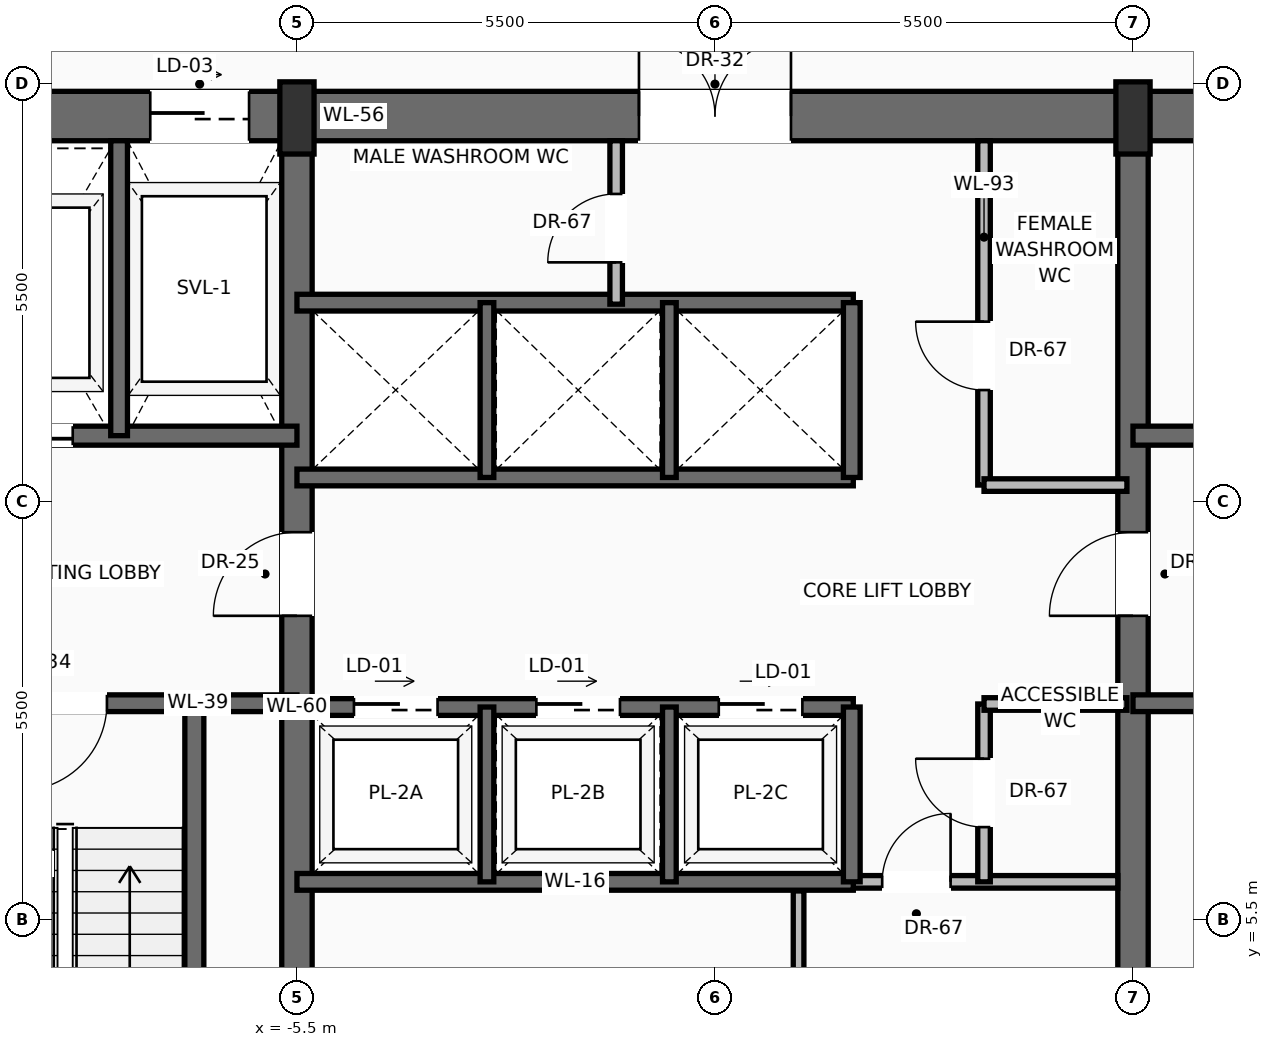
"""IFC4 building model, lengths in metres.
Left out: names, types, materials, properties, quantities, classifications, styles, units other than length and angle.
Written with IfcOpenShell. Run it as: python <this file> out.ifc"""

import sys

from ifc_helpers import new_model, si_unit, direction, frame, frame_2d, origin, origin_2d, place, context, subcontext, project, spatial, rectangle, extrude, source, transform, mapped, element, fill, save


model = new_model("IFC4")
c1 = context("Model", 3, precision=1e-05, world=origin(), true_north=direction((0.0, 1.0)))
c2 = subcontext(c1, "Body", "Model", "MODEL_VIEW")
j1 = project(units=[si_unit("LENGTHUNIT", "METRE"), si_unit("PLANEANGLEUNIT", "RADIAN")], contexts=[c1])
p1 = place(None, origin())
s1 = spatial("IfcSite", under=j1, at=p1, CompositionType="ELEMENT")
p2 = place(p1, origin())
s2 = spatial("IfcBuilding", under=s1, at=p2, CompositionType="ELEMENT")
p3 = place(p2, frame((0.0, 0.0, 208.0)))
s3 = spatial("IfcBuildingStorey", under=s2, at=p3, CompositionType="ELEMENT", Elevation=208.0)
p4 = place(p3, frame((-10.8, 16.075, 0.0), z_axis=(0.0, 0.0, 1.0), x_axis=(1.0, 0.0, 0.0)))
e1 = element("IfcWall", 1, at=p4, inside=s3, PredefinedType="SHEAR", context=c2, shape_type="SweptSolid", body=[
    extrude(rectangle(XDim=21.6, YDim=0.65, at=frame_2d((10.8, 0.0))), origin(), (0.0, 0.0, 1.0), 3.47),
])
p5 = place(p4, frame((3.37, 0.0, 0.0)))
e2 = element("IfcOpeningElement", 2, at=p5, cuts=e1, PredefinedType="OPENING", context=c2, shape_type="SweptSolid", body=[
    extrude(rectangle(XDim=1.3, YDim=2.3, at=frame_2d((0.65, 1.15))), frame((0.0, 0.335, 0.0), z_axis=(0.0, -1.0, 0.0), x_axis=(1.0, 0.0, 0.0)), (0.0, 0.0, 1.0), 0.67),
])
p6 = place(p4, frame((9.8, 0.0, 0.0)))
e3 = element("IfcOpeningElement", 3, at=p6, cuts=e1, PredefinedType="OPENING", context=c2, shape_type="SweptSolid", body=[
    extrude(rectangle(XDim=2.0, YDim=2.4, at=frame_2d((1.0, 1.2))), frame((0.0, 0.335, 0.0), z_axis=(0.0, -1.0, 0.0), x_axis=(1.0, 0.0, 0.0)), (0.0, 0.0, 1.0), 0.67),
])
p7 = place(p3, frame((-5.5, 0.525, 0.0), z_axis=(0.0, 0.0, 1.0), x_axis=(0.0, 1.0, 0.0)))
e4 = element("IfcWall", 4, at=p7, inside=s3, PredefinedType="SHEAR", context=c2, shape_type="SweptSolid", body=[
    extrude(rectangle(XDim=15.55, YDim=0.4, at=frame_2d((7.775, 0.0))), origin(), (0.0, 0.0, 1.0), 3.47),
])
p8 = place(p7, frame((8.975, 0.0, 0.0)))
e5 = element("IfcOpeningElement", 5, at=p8, cuts=e4, PredefinedType="OPENING", context=c2, shape_type="SweptSolid", body=[
    extrude(rectangle(XDim=1.1, YDim=2.2, at=frame_2d((0.55, 1.1))), frame((0.0, 0.21, 0.0), z_axis=(0.0, -1.0, 0.0), x_axis=(1.0, 0.0, 0.0)), (0.0, 0.0, 1.0), 0.42),
])
p9 = place(p3, frame((5.5, 0.525, 0.0), z_axis=(0.0, 0.0, 1.0), x_axis=(0.0, 1.0, 0.0)))
e6 = element("IfcWall", 6, at=p9, inside=s3, PredefinedType="SHEAR", context=c2, shape_type="SweptSolid", body=[
    extrude(rectangle(XDim=15.55, YDim=0.4, at=frame_2d((7.775, 0.0))), origin(), (0.0, 0.0, 1.0), 3.47),
])
p10 = place(p9, frame((8.975, 0.0, 0.0)))
e7 = element("IfcOpeningElement", 7, at=p10, cuts=e6, PredefinedType="OPENING", context=c2, shape_type="SweptSolid", body=[
    extrude(rectangle(XDim=1.1, YDim=2.2, at=frame_2d((0.55, 1.1))), frame((0.0, 0.21, 0.0), z_axis=(0.0, -1.0, 0.0), x_axis=(1.0, 0.0, 0.0)), (0.0, 0.0, 1.0), 0.42),
])
m1 = source(origin(), c2, "Body", "SweptSolid", [
    extrude(rectangle(XDim=0.45, YDim=0.95, at=origin_2d()), origin(), (0.0, 0.0, 1.0), 3.7),
])
for number, where, z_axis, x_axis in (
    (8, (-5.5, 16.05, 0.0), (0.0, 0.0, 1.0), (1.0, 0.0, 0.0)),
    (9, (5.5, 16.05, 0.0), (0.0, 0.0, 1.0), (1.0, 0.0, 0.0)),
):
    element("IfcColumn", number, at=place(p3, frame(where, z_axis=z_axis, x_axis=x_axis)), inside=s3, PredefinedType="PILASTER", context=c2, shape_type="MappedRepresentation", body=[
        mapped(m1, transform((0.0, 0.0, 0.0), scale=1.0)),
    ])
p11 = place(p3, frame((-6.85, 0.85, 0.0), z_axis=(0.0, 0.0, 1.0), x_axis=(0.0, 1.0, 0.0)))
e10 = element("IfcWall", 10, at=p11, inside=s3, PredefinedType="SOLIDWALL", context=c2, shape_type="SweptSolid", body=[
    extrude(rectangle(XDim=7.5, YDim=0.25, at=frame_2d((3.75, 0.0))), origin(), (0.0, 0.0, 1.0), 3.47),
])
p12 = place(p3, frame((-5.5, 8.35, 0.0), z_axis=(0.0, 0.0, 1.0), x_axis=(-1.0, 0.0, 0.0)))
e11 = element("IfcWall", 11, at=p12, inside=s3, PredefinedType="SOLIDWALL", context=c2, shape_type="SweptSolid", body=[
    extrude(rectangle(XDim=4.65, YDim=0.22, at=frame_2d((2.325, 0.0))), origin(), (0.0, 0.0, 1.0), 3.47),
])
p13 = place(p12, frame((2.5, 0.0, 0.0)))
e12 = element("IfcOpeningElement", 12, at=p13, cuts=e11, PredefinedType="OPENING", context=c2, shape_type="SweptSolid", body=[
    extrude(rectangle(XDim=1.15, YDim=2.2, at=frame_2d((0.575, 1.1))), frame((0.0, 0.12, 0.0), z_axis=(0.0, -1.0, 0.0), x_axis=(1.0, 0.0, 0.0)), (0.0, 0.0, 1.0), 0.24),
])
p14 = place(p3, frame((-5.5, 11.87, 0.0), z_axis=(0.0, 0.0, 1.0), x_axis=(-1.0, 0.0, 0.0)))
e13 = element("IfcWall", 13, at=p14, inside=s3, PredefinedType="SOLIDWALL", context=c2, shape_type="SweptSolid", body=[
    extrude(rectangle(XDim=4.65, YDim=0.25, at=frame_2d((2.325, 0.0))), origin(), (0.0, 0.0, 1.0), 3.47),
])
p15 = place(p14, frame((2.95, 0.0, 0.0)))
e14 = element("IfcOpeningElement", 14, at=p15, cuts=e13, PredefinedType="OPENING", context=c2, shape_type="SweptSolid", body=[
    extrude(rectangle(XDim=1.2, YDim=2.25, at=frame_2d((0.6, 1.125))), frame((0.0, 0.135, 0.0), z_axis=(0.0, -1.0, 0.0), x_axis=(1.0, 0.0, 0.0)), (0.0, 0.0, 1.0), 0.27),
])
p16 = place(p3, frame((-7.84, 11.87, 0.0), z_axis=(0.0, 0.0, 1.0), x_axis=(0.0, 1.0, 0.0)))
e15 = element("IfcWall", 15, at=p16, inside=s3, PredefinedType="SOLIDWALL", context=c2, shape_type="SweptSolid", body=[
    extrude(rectangle(XDim=3.88, YDim=0.22, at=frame_2d((1.94, 0.0))), origin(), (0.0, 0.0, 1.0), 3.47),
])
p17 = place(p3, frame((10.15, 8.35, 0.0), z_axis=(0.0, 0.0, 1.0), x_axis=(-1.0, 0.0, 0.0)))
e16 = element("IfcWall", 16, at=p17, inside=s3, PredefinedType="SOLIDWALL", context=c2, shape_type="SweptSolid", body=[
    extrude(rectangle(XDim=4.65, YDim=0.22, at=frame_2d((2.325, 0.0))), origin(), (0.0, 0.0, 1.0), 3.47),
])
p18 = place(p17, frame((1.0, 0.0, 0.0)))
e17 = element("IfcOpeningElement", 17, at=p18, cuts=e16, PredefinedType="OPENING", context=c2, shape_type="SweptSolid", body=[
    extrude(rectangle(XDim=1.15, YDim=2.2, at=frame_2d((0.575, 1.1))), frame((0.0, 0.12, 0.0), z_axis=(0.0, -1.0, 0.0), x_axis=(1.0, 0.0, 0.0)), (0.0, 0.0, 1.0), 0.24),
])
p19 = place(p3, frame((10.15, 11.87, 0.0), z_axis=(0.0, 0.0, 1.0), x_axis=(-1.0, 0.0, 0.0)))
e18 = element("IfcWall", 18, at=p19, inside=s3, PredefinedType="SOLIDWALL", context=c2, shape_type="SweptSolid", body=[
    extrude(rectangle(XDim=4.65, YDim=0.25, at=frame_2d((2.325, 0.0))), origin(), (0.0, 0.0, 1.0), 3.47),
])
p20 = place(p19, frame((0.5, 0.0, 0.0)))
e19 = element("IfcOpeningElement", 19, at=p20, cuts=e18, PredefinedType="OPENING", context=c2, shape_type="SweptSolid", body=[
    extrude(rectangle(XDim=1.2, YDim=2.25, at=frame_2d((0.6, 1.125))), frame((0.0, 0.135, 0.0), z_axis=(0.0, -1.0, 0.0), x_axis=(1.0, 0.0, 0.0)), (0.0, 0.0, 1.0), 0.27),
])
p21 = place(p3, frame((1.82, 6.0, 0.0), z_axis=(0.0, 0.0, 1.0), x_axis=(1.0, 0.0, 0.0)))
e20 = element("IfcWall", 20, at=p21, inside=s3, PredefinedType="PARTITIONING", context=c2, shape_type="SweptSolid", body=[
    extrude(rectangle(XDim=3.48, YDim=0.165, at=frame_2d((1.74, 0.0))), origin(), (0.0, 0.0, 1.0), 3.462),
])
p22 = place(p21, frame((0.38, 0.0, 0.0)))
e21 = element("IfcOpeningElement", 21, at=p22, cuts=e20, PredefinedType="OPENING", context=c2, shape_type="SweptSolid", body=[
    extrude(rectangle(XDim=0.9, YDim=2.1, at=frame_2d((0.45, 1.05))), frame((0.0, 0.093, 0.0), z_axis=(0.0, -1.0, 0.0), x_axis=(1.0, 0.0, 0.0)), (0.0, 0.0, 1.0), 0.185),
])
p23 = place(p3, frame((1.1, 0.85, 0.0), z_axis=(0.0, 0.0, 1.0), x_axis=(0.0, 1.0, 0.0)))
e22 = element("IfcWall", 22, at=p23, inside=s3, PredefinedType="PARTITIONING", context=c2, shape_type="SweptSolid", body=[
    extrude(rectangle(XDim=5.03, YDim=0.14, at=frame_2d((2.515, 0.0))), origin(), (0.0, 0.0, 1.0), 3.462),
])
p24 = place(p23, frame((2.1, 0.0, 0.0)))
e23 = element("IfcOpeningElement", 23, at=p24, cuts=e22, PredefinedType="OPENING", context=c2, shape_type="SweptSolid", body=[
    extrude(rectangle(XDim=0.9, YDim=2.1, at=frame_2d((0.45, 1.05))), frame((0.0, 0.08, 0.0), z_axis=(0.0, -1.0, 0.0), x_axis=(1.0, 0.0, 0.0)), (0.0, 0.0, 1.0), 0.16),
])
p25 = place(p3, frame((3.54, 6.0, 0.0), z_axis=(0.0, 0.0, 1.0), x_axis=(0.0, 1.0, 0.0)))
e24 = element("IfcWall", 24, at=p25, inside=s3, PredefinedType="PARTITIONING", context=c2, shape_type="SweptSolid", body=[
    extrude(rectangle(XDim=2.34, YDim=0.165, at=frame_2d((1.17, 0.0))), origin(), (0.0, 0.0, 1.0), 3.462),
])
p26 = place(p25, frame((0.72, 0.0, 0.0)))
e25 = element("IfcOpeningElement", 25, at=p26, cuts=e24, PredefinedType="OPENING", context=c2, shape_type="SweptSolid", body=[
    extrude(rectangle(XDim=0.9, YDim=2.1, at=frame_2d((0.45, 1.05))), frame((0.0, 0.093, 0.0), z_axis=(0.0, -1.0, 0.0), x_axis=(1.0, 0.0, 0.0)), (0.0, 0.0, 1.0), 0.185),
])
p27 = place(p3, frame((3.54, 8.34, 0.0), z_axis=(0.0, 0.0, 1.0), x_axis=(1.0, 0.0, 0.0)))
e26 = element("IfcWall", 26, at=p27, inside=s3, PredefinedType="PARTITIONING", context=c2, shape_type="SweptSolid", body=[
    extrude(rectangle(XDim=1.88, YDim=0.165, at=frame_2d((0.94, 0.0))), origin(), (0.0, 0.0, 1.0), 3.462),
])
p28 = place(p3, frame((-5.5, 6.0, 0.0), z_axis=(0.0, 0.0, 1.0), x_axis=(1.0, 0.0, 0.0)))
e27 = element("IfcWall", 27, at=p28, inside=s3, PredefinedType="SOLIDWALL", context=c2, shape_type="SweptSolid", body=[
    extrude(rectangle(XDim=7.32, YDim=0.22, at=frame_2d((3.66, 0.0))), origin(), (0.0, 0.0, 1.0), 3.47),
])
p29 = place(p3, frame((-5.5, 8.3, 0.0), z_axis=(0.0, 0.0, 1.0), x_axis=(1.0, 0.0, 0.0)))
e28 = element("IfcWall", 28, at=p29, inside=s3, PredefinedType="SOLIDWALL", context=c2, shape_type="SweptSolid", body=[
    extrude(rectangle(XDim=7.32, YDim=0.22, at=frame_2d((3.66, 0.0))), origin(), (0.0, 0.0, 1.0), 3.47),
])
p30 = place(p29, frame((0.75, 0.0, 0.0)))
e29 = element("IfcOpeningElement", 29, at=p30, cuts=e28, PredefinedType="OPENING", context=c2, shape_type="SweptSolid", body=[
    extrude(rectangle(XDim=1.1, YDim=2.2, at=frame_2d((0.55, 1.1))), frame((0.0, 0.12, 0.0), z_axis=(0.0, -1.0, 0.0), x_axis=(1.0, 0.0, 0.0)), (0.0, 0.0, 1.0), 0.24),
])
p31 = place(p29, frame((3.15, 0.0, 0.0)))
e30 = element("IfcOpeningElement", 30, at=p31, cuts=e28, PredefinedType="OPENING", context=c2, shape_type="SweptSolid", body=[
    extrude(rectangle(XDim=1.1, YDim=2.2, at=frame_2d((0.55, 1.1))), frame((0.0, 0.12, 0.0), z_axis=(0.0, -1.0, 0.0), x_axis=(1.0, 0.0, 0.0)), (0.0, 0.0, 1.0), 0.24),
])
p32 = place(p29, frame((5.55, 0.0, 0.0)))
e31 = element("IfcOpeningElement", 31, at=p32, cuts=e28, PredefinedType="OPENING", context=c2, shape_type="SweptSolid", body=[
    extrude(rectangle(XDim=1.1, YDim=2.2, at=frame_2d((0.55, 1.1))), frame((0.0, 0.12, 0.0), z_axis=(0.0, -1.0, 0.0), x_axis=(1.0, 0.0, 0.0)), (0.0, 0.0, 1.0), 0.24),
])
p33 = place(p3, frame((1.8, 6.0, 0.0), z_axis=(0.0, 0.0, 1.0), x_axis=(0.0, 1.0, 0.0)))
e32 = element("IfcWall", 32, at=p33, inside=s3, PredefinedType="SOLIDWALL", context=c2, shape_type="SweptSolid", body=[
    extrude(rectangle(XDim=2.3, YDim=0.22, at=frame_2d((1.15, 0.0))), origin(), (0.0, 0.0, 1.0), 3.47),
])
for number, where, z_axis, x_axis in (
    (33, (-3.0, 6.0, 0.0), (0.0, 0.0, 1.0), (0.0, 1.0, 0.0)),
    (34, (-0.6, 6.0, 0.0), (0.0, 0.0, 1.0), (0.0, 1.0, 0.0)),
):
    element("IfcWall", number, at=place(p3, frame(where, z_axis=z_axis, x_axis=x_axis)), inside=s3, PredefinedType="SOLIDWALL", context=c2, shape_type="SweptSolid", body=[
        extrude(rectangle(XDim=2.3, YDim=0.18, at=frame_2d((1.15, 0.0))), origin(), (0.0, 0.0, 1.0), 3.47),
    ])
for number, where, z_axis, x_axis in (
    (35, (-5.5, 11.32, 0.0), (0.0, 0.0, 1.0), (1.0, 0.0, 0.0)),
    (36, (-5.5, 13.62, 0.0), (0.0, 0.0, 1.0), (1.0, 0.0, 0.0)),
):
    element("IfcWall", number, at=place(p3, frame(where, z_axis=z_axis, x_axis=x_axis)), inside=s3, PredefinedType="SOLIDWALL", context=c2, shape_type="SweptSolid", body=[
        extrude(rectangle(XDim=7.32, YDim=0.22, at=frame_2d((3.66, 0.0))), origin(), (0.0, 0.0, 1.0), 3.47),
    ])
p34 = place(p3, frame((1.8, 11.32, 0.0), z_axis=(0.0, 0.0, 1.0), x_axis=(0.0, 1.0, 0.0)))
e37 = element("IfcWall", 37, at=p34, inside=s3, PredefinedType="SOLIDWALL", context=c2, shape_type="SweptSolid", body=[
    extrude(rectangle(XDim=2.3, YDim=0.22, at=frame_2d((1.15, 0.0))), origin(), (0.0, 0.0, 1.0), 3.47),
])
for number, where, z_axis, x_axis in (
    (38, (-3.0, 11.32, 0.0), (0.0, 0.0, 1.0), (0.0, 1.0, 0.0)),
    (39, (-0.6, 11.32, 0.0), (0.0, 0.0, 1.0), (0.0, 1.0, 0.0)),
):
    element("IfcWall", number, at=place(p3, frame(where, z_axis=z_axis, x_axis=x_axis)), inside=s3, PredefinedType="SOLIDWALL", context=c2, shape_type="SweptSolid", body=[
        extrude(rectangle(XDim=2.3, YDim=0.18, at=frame_2d((1.15, 0.0))), origin(), (0.0, 0.0, 1.0), 3.47),
    ])
p35 = place(p3, frame((-1.3, 13.6, 0.0), z_axis=(0.0, 0.0, 1.0), x_axis=(0.0, 1.0, 0.0)))
e40 = element("IfcWall", 40, at=p35, inside=s3, PredefinedType="PARTITIONING", context=c2, shape_type="SweptSolid", body=[
    extrude(rectangle(XDim=2.15, YDim=0.165, at=frame_2d((1.075, 0.0))), origin(), (0.0, 0.0, 1.0), 3.462),
])
p36 = place(p35, frame((0.55, 0.0, 0.0)))
e41 = element("IfcOpeningElement", 41, at=p36, cuts=e40, PredefinedType="OPENING", context=c2, shape_type="SweptSolid", body=[
    extrude(rectangle(XDim=0.9, YDim=2.1, at=frame_2d((0.45, 1.05))), frame((0.0, 0.093, 0.0), z_axis=(0.0, -1.0, 0.0), x_axis=(1.0, 0.0, 0.0)), (0.0, 0.0, 1.0), 0.185),
])
p37 = place(p3, frame((3.54, 11.22, 0.0), z_axis=(0.0, 0.0, 1.0), x_axis=(0.0, 1.0, 0.0)))
e42 = element("IfcWall", 42, at=p37, inside=s3, PredefinedType="PARTITIONING", context=c2, shape_type="SweptSolid", body=[
    extrude(rectangle(XDim=4.53, YDim=0.165, at=frame_2d((2.265, 0.0))), origin(), (0.0, 0.0, 1.0), 3.462),
])
p38 = place(p37, frame((1.25, 0.0, 0.0)))
e43 = element("IfcOpeningElement", 43, at=p38, cuts=e42, PredefinedType="OPENING", context=c2, shape_type="SweptSolid", body=[
    extrude(rectangle(XDim=0.9, YDim=2.1, at=frame_2d((0.45, 1.05))), frame((0.0, 0.093, 0.0), z_axis=(0.0, -1.0, 0.0), x_axis=(1.0, 0.0, 0.0)), (0.0, 0.0, 1.0), 0.185),
])
p39 = place(p3, frame((3.54, 11.22, 0.0), z_axis=(0.0, 0.0, 1.0), x_axis=(1.0, 0.0, 0.0)))
e44 = element("IfcWall", 44, at=p39, inside=s3, PredefinedType="PARTITIONING", context=c2, shape_type="SweptSolid", body=[
    extrude(rectangle(XDim=1.88, YDim=0.165, at=frame_2d((0.94, 0.0))), origin(), (0.0, 0.0, 1.0), 3.462),
])
m2 = source(origin(), c2, "Body", "SweptSolid", [
    extrude(rectangle(XDim=1.15, YDim=2.2, at=frame_2d((0.575, 1.1))), frame((0.0, 0.025, 0.0), z_axis=(0.0, -1.0, 0.0), x_axis=(1.0, 0.0, 0.0)), (0.0, 0.0, 1.0), 0.05),
])
p40 = place(p13, origin())
e45 = element("IfcDoor", 45, at=p40, inside=s3, OperationType="SINGLE_SWING_RIGHT", PredefinedType="DOOR", context=c2, shape_type="MappedRepresentation", body=[
    mapped(m2, transform((0.0, 0.0, 0.0), scale=1.0)),
])
fill(e12, e45)
m3 = source(origin(), c2, "Body", "SweptSolid", [
    extrude(rectangle(XDim=1.1, YDim=2.2, at=frame_2d((0.55, 1.1))), frame((0.0, 0.025, 0.0), z_axis=(0.0, -1.0, 0.0), x_axis=(1.0, 0.0, 0.0)), (0.0, 0.0, 1.0), 0.05),
])
p41 = place(p8, origin())
e46 = element("IfcDoor", 46, at=p41, inside=s3, OperationType="SINGLE_SWING_LEFT", PredefinedType="DOOR", context=c2, shape_type="MappedRepresentation", body=[
    mapped(m3, transform((0.0, 0.0, 0.0), scale=1.0)),
])
fill(e5, e46)
m4 = source(origin(), c2, "Body", "SweptSolid", [
    extrude(rectangle(XDim=1.2, YDim=2.25, at=frame_2d((0.6, 1.125))), frame((0.0, 0.025, 0.0), z_axis=(0.0, -1.0, 0.0), x_axis=(1.0, 0.0, 0.0)), (0.0, 0.0, 1.0), 0.05),
])
p42 = place(p15, origin())
e47 = element("IfcDoor", 47, at=p42, inside=s3, OperationType="SLIDING_TO_LEFT", PredefinedType="DOOR", context=c2, shape_type="MappedRepresentation", body=[
    mapped(m4, transform((0.0, 0.0, 0.0), scale=1.0)),
])
fill(e14, e47)
m5 = source(origin(), c2, "Body", "SweptSolid", [
    extrude(rectangle(XDim=1.3, YDim=2.3, at=frame_2d((0.65, 1.15))), frame((0.0, 0.025, 0.0), z_axis=(0.0, -1.0, 0.0), x_axis=(1.0, 0.0, 0.0)), (0.0, 0.0, 1.0), 0.05),
])
p43 = place(p5, origin())
e48 = element("IfcDoor", 48, at=p43, inside=s3, OperationType="SLIDING_TO_RIGHT", PredefinedType="DOOR", context=c2, shape_type="MappedRepresentation", body=[
    mapped(m5, transform((0.0, 0.0, 0.0), scale=1.0)),
])
fill(e2, e48)
p44 = place(p10, origin())
e49 = element("IfcDoor", 49, at=p44, inside=s3, OperationType="SINGLE_SWING_LEFT", PredefinedType="DOOR", context=c2, shape_type="MappedRepresentation", body=[
    mapped(m3, transform((0.0, 0.0, 0.0), scale=1.0)),
])
fill(e7, e49)
m6 = source(origin(), c2, "Body", "SweptSolid", [
    extrude(rectangle(XDim=2.0, YDim=2.4, at=frame_2d((1.0, 1.2))), frame((0.0, 0.025, 0.0), z_axis=(0.0, -1.0, 0.0), x_axis=(1.0, 0.0, 0.0)), (0.0, 0.0, 1.0), 0.05),
])
p45 = place(p6, origin())
e50 = element("IfcDoor", 50, at=p45, inside=s3, OperationType="DOUBLE_DOOR_SINGLE_SWING", PredefinedType="DOOR", context=c2, shape_type="MappedRepresentation", body=[
    mapped(m6, transform((0.0, 0.0, 0.0), scale=1.0)),
])
fill(e3, e50)
m7 = source(origin(), c2, "Body", "SweptSolid", [
    extrude(rectangle(XDim=0.9, YDim=2.1, at=frame_2d((0.45, 1.05))), frame((0.0, 0.025, 0.0), z_axis=(0.0, -1.0, 0.0), x_axis=(1.0, 0.0, 0.0)), (0.0, 0.0, 1.0), 0.05),
])
p46 = place(p22, origin())
e51 = element("IfcDoor", 51, at=p46, inside=s3, OperationType="SINGLE_SWING_RIGHT", PredefinedType="DOOR", context=c2, shape_type="MappedRepresentation", body=[
    mapped(m7, transform((0.0, 0.0, 0.0), scale=1.0)),
])
fill(e21, e51)
p47 = place(p26, origin())
e52 = element("IfcDoor", 52, at=p47, inside=s3, OperationType="SINGLE_SWING_RIGHT", PredefinedType="DOOR", context=c2, shape_type="MappedRepresentation", body=[
    mapped(m7, transform((0.0, 0.0, 0.0), scale=1.0)),
])
fill(e25, e52)
m8 = source(origin(), c2, "Body", "SweptSolid", [
    extrude(rectangle(XDim=1.1, YDim=2.2, at=frame_2d((0.55, 1.1))), frame((0.0, 0.025, 0.0), z_axis=(0.0, -1.0, 0.0), x_axis=(1.0, 0.0, 0.0)), (0.0, 0.0, 1.0), 0.05),
])
p48 = place(p30, origin())
e53 = element("IfcDoor", 53, at=p48, inside=s3, OperationType="SLIDING_TO_LEFT", PredefinedType="DOOR", context=c2, shape_type="MappedRepresentation", body=[
    mapped(m8, transform((0.0, 0.0, 0.0), scale=1.0)),
])
fill(e29, e53)
p49 = place(p31, origin())
e54 = element("IfcDoor", 54, at=p49, inside=s3, OperationType="SLIDING_TO_LEFT", PredefinedType="DOOR", context=c2, shape_type="MappedRepresentation", body=[
    mapped(m8, transform((0.0, 0.0, 0.0), scale=1.0)),
])
fill(e30, e54)
p50 = place(p32, origin())
e55 = element("IfcDoor", 55, at=p50, inside=s3, OperationType="SLIDING_TO_LEFT", PredefinedType="DOOR", context=c2, shape_type="MappedRepresentation", body=[
    mapped(m8, transform((0.0, 0.0, 0.0), scale=1.0)),
])
fill(e31, e55)
p51 = place(p36, origin())
e56 = element("IfcDoor", 56, at=p51, inside=s3, OperationType="SINGLE_SWING_LEFT", PredefinedType="DOOR", context=c2, shape_type="MappedRepresentation", body=[
    mapped(m7, transform((0.0, 0.0, 0.0), scale=1.0)),
])
fill(e41, e56)
p52 = place(p38, origin())
e57 = element("IfcDoor", 57, at=p52, inside=s3, OperationType="SINGLE_SWING_RIGHT", PredefinedType="DOOR", context=c2, shape_type="MappedRepresentation", body=[
    mapped(m7, transform((0.0, 0.0, 0.0), scale=1.0)),
])
fill(e43, e57)
save(model, sys.argv[1])
